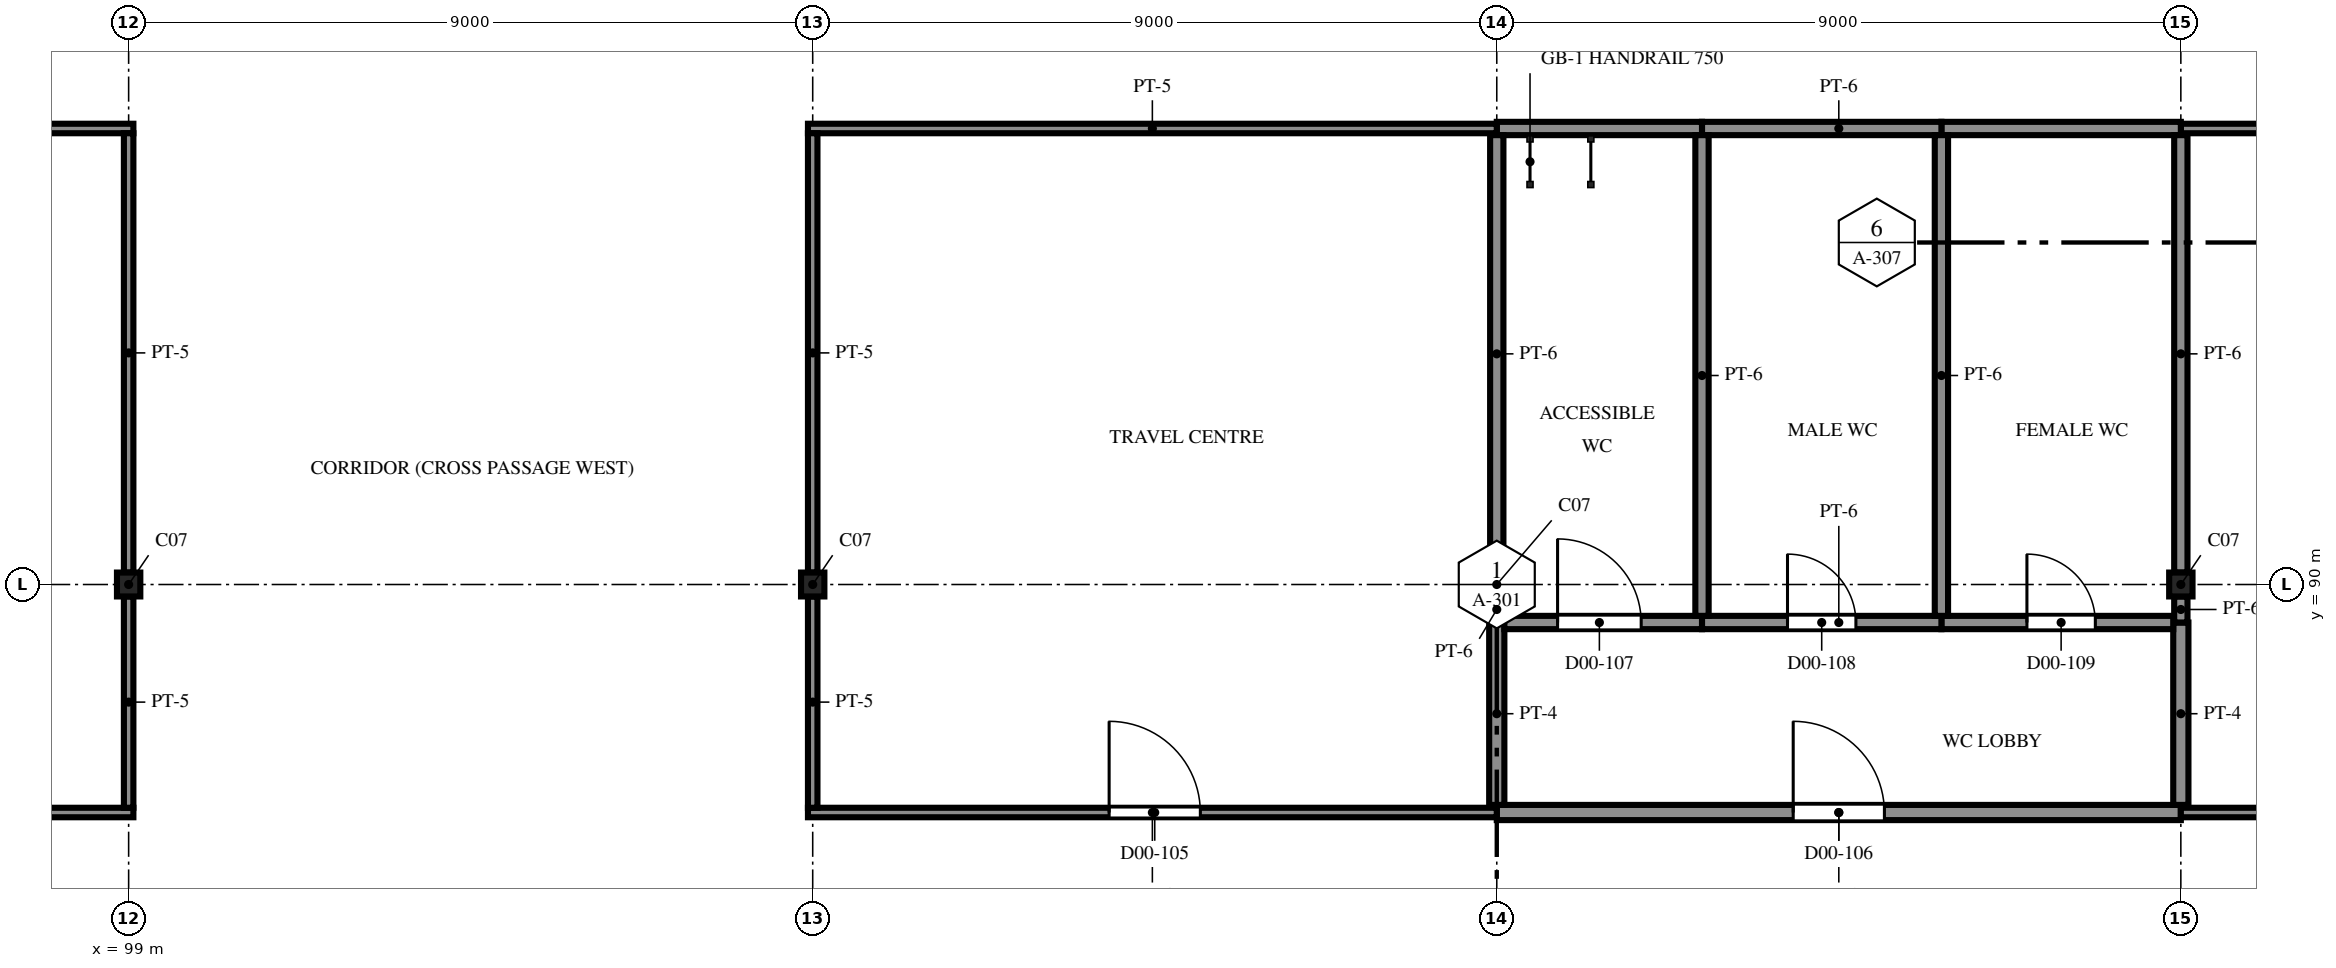
"""IFC4 building model, lengths in metres.
Left out: names, types, materials, properties, quantities, classifications, styles, units other than length and angle.
Written with IfcOpenShell. Run it as: python <this file> out.ifc"""

import sys

from ifc_helpers import new_model, si_unit, direction, frame, frame_2d, origin, origin_2d, place, context, subcontext, project, spatial, polyline, rectangle, i_section, outline, extrude, element, fill, save


model = new_model("IFC4")
c1 = context("Model", 3, precision=1e-05, world=origin(), true_north=direction((0.0, 1.0)))
c2 = subcontext(c1, "Body", "Model", "MODEL_VIEW")
j1 = project(units=[si_unit("LENGTHUNIT", "METRE"), si_unit("PLANEANGLEUNIT", "RADIAN")], contexts=[c1])
p1 = place(None, origin())
s1 = spatial("IfcSite", under=j1, at=p1, CompositionType="ELEMENT")
p2 = place(p1, origin())
s2 = spatial("IfcBuilding", under=s1, at=p2, CompositionType="ELEMENT")
p3 = place(p2, origin())
s3 = spatial("IfcBuildingStorey", under=s2, at=p3, CompositionType="ELEMENT", Elevation=0.0)
for number, where, z_axis, x_axis in (
    (1, (99.0, 90.0, -2.1), (0.0, 0.0, 1.0), (1.0, 0.0, 0.0)),
    (2, (108.0, 90.0, -2.1), (0.0, 0.0, 1.0), (1.0, 0.0, 0.0)),
    (3, (117.0, 90.0, -2.1), (0.0, 0.0, 1.0), (1.0, 0.0, 0.0)),
    (4, (126.0, 90.0, -2.1), (0.0, 0.0, 1.0), (1.0, 0.0, 0.0)),
):
    element("IfcColumn", number, at=place(p3, frame(where, z_axis=z_axis, x_axis=x_axis)), inside=s3, PredefinedType="COLUMN", context=c2, shape_type="SweptSolid", body=[
        extrude(i_section(OverallWidth=0.307, OverallDepth=0.314, WebThickness=0.012, FlangeThickness=0.019, FilletRadius=0.015, at=origin_2d()), origin(), (0.0, 0.0, 1.0), 9.6),
    ])
p4 = place(p3, frame((135.062, 96.0, 0.0), z_axis=(0.0, 0.0, 1.0), x_axis=(-1.0, 0.0, 0.0)))
e5 = element("IfcWall", 5, at=p4, inside=s3, PredefinedType="PARTITIONING", context=c2, shape_type="SweptSolid", body=[
    extrude(rectangle(XDim=9.062, YDim=0.125, at=frame_2d((4.531, 0.0))), origin(), (0.0, 0.0, 1.0), 6.757),
])
p5 = place(p3, frame((126.0, 96.0, 0.0), z_axis=(0.0, 0.0, 1.0), x_axis=(-1.0, 0.0, 0.0)))
e6 = element("IfcWall", 6, at=p5, inside=s3, PredefinedType="PARTITIONING", context=c2, shape_type="SweptSolid", body=[
    extrude(rectangle(XDim=3.15, YDim=0.175, at=frame_2d((1.575, 0.0))), origin(), (0.0, 0.0, 1.0), 6.459),
])
p6 = place(p3, frame((122.85, 96.0, 0.0), z_axis=(0.0, 0.0, 1.0), x_axis=(-1.0, 0.0, 0.0)))
e7 = element("IfcWall", 7, at=p6, inside=s3, PredefinedType="PARTITIONING", context=c2, shape_type="SweptSolid", body=[
    extrude(rectangle(XDim=3.15, YDim=0.175, at=frame_2d((1.575, 0.0))), origin(), (0.0, 0.0, 1.0), 6.459),
])
p7 = place(p3, frame((119.7, 96.0, 0.0), z_axis=(0.0, 0.0, 1.0), x_axis=(-1.0, 0.0, 0.0)))
e8 = element("IfcWall", 8, at=p7, inside=s3, PredefinedType="PARTITIONING", context=c2, shape_type="SweptSolid", body=[
    extrude(rectangle(XDim=2.7, YDim=0.175, at=frame_2d((1.35, 0.0))), origin(), (0.0, 0.0, 1.0), 6.459),
])
for number, where, z_axis, x_axis in (
    (9, (117.0, 96.0, 0.0), (0.0, 0.0, 1.0), (-1.0, 0.0, 0.0)),
    (10, (99.062, 96.0, 0.0), (0.0, 0.0, 1.0), (-1.0, 0.0, 0.0)),
):
    element("IfcWall", number, at=place(p3, frame(where, z_axis=z_axis, x_axis=x_axis)), inside=s3, PredefinedType="PARTITIONING", context=c2, shape_type="SweptSolid", body=[
        extrude(rectangle(XDim=9.062, YDim=0.125, at=frame_2d((4.531, 0.0))), origin(), (0.0, 0.0, 1.0), 6.757),
    ])
p8 = place(p3, frame((117.0, 87.0, 0.0), z_axis=(0.0, 0.0, 1.0), x_axis=(1.0, 0.0, 0.0)))
e11 = element("IfcWall", 11, at=p8, inside=s3, PredefinedType="PARTITIONING", context=c2, shape_type="SweptSolid", body=[
    extrude(rectangle(XDim=9.0, YDim=0.2, at=frame_2d((4.5, 0.0))), origin(), (0.0, 0.0, 1.0), 6.6),
])
p9 = place(p8, frame((3.9, 0.0, 0.0)))
e12 = element("IfcOpeningElement", 12, at=p9, cuts=e11, PredefinedType="OPENING", context=c2, shape_type="SweptSolid", body=[
    extrude(rectangle(XDim=1.2, YDim=2.1, at=frame_2d((0.6, 1.05))), frame((0.0, 0.11, 0.0), z_axis=(0.0, -1.0, 0.0), x_axis=(1.0, 0.0, 0.0)), (0.0, 0.0, 1.0), 0.22),
])
p10 = place(p3, frame((126.0, 87.0, 0.0), z_axis=(0.0, 0.0, 1.0), x_axis=(1.0, 0.0, 0.0)))
e13 = element("IfcWall", 13, at=p10, inside=s3, PredefinedType="PARTITIONING", context=c2, shape_type="SweptSolid", body=[
    extrude(rectangle(XDim=9.062, YDim=0.125, at=frame_2d((4.531, 0.0))), origin(), (0.0, 0.0, 1.0), 6.757),
])
p11 = place(p10, frame((3.9, 0.0, 0.0)))
e14 = element("IfcOpeningElement", 14, at=p11, cuts=e13, PredefinedType="OPENING", context=c2, shape_type="SweptSolid", body=[
    extrude(rectangle(XDim=1.2, YDim=2.1, at=frame_2d((0.6, 1.05))), frame((0.0, 0.073, 0.0), z_axis=(0.0, -1.0, 0.0), x_axis=(1.0, 0.0, 0.0)), (0.0, 0.0, 1.0), 0.145),
])
p12 = place(p3, frame((107.938, 87.0, 0.0), z_axis=(0.0, 0.0, 1.0), x_axis=(1.0, 0.0, 0.0)))
e15 = element("IfcWall", 15, at=p12, inside=s3, PredefinedType="PARTITIONING", context=c2, shape_type="SweptSolid", body=[
    extrude(rectangle(XDim=9.062, YDim=0.125, at=frame_2d((4.531, 0.0))), origin(), (0.0, 0.0, 1.0), 6.757),
])
p13 = place(p12, frame((3.962, 0.0, 0.0)))
e16 = element("IfcOpeningElement", 16, at=p13, cuts=e15, PredefinedType="OPENING", context=c2, shape_type="SweptSolid", body=[
    extrude(rectangle(XDim=1.2, YDim=2.1, at=frame_2d((0.6, 1.05))), frame((0.0, 0.073, 0.0), z_axis=(0.0, -1.0, 0.0), x_axis=(1.0, 0.0, 0.0)), (0.0, 0.0, 1.0), 0.145),
])
p14 = place(p3, frame((90.302, 87.0, 0.0), z_axis=(0.0, 0.0, 1.0), x_axis=(1.0, 0.0, 0.0)))
e17 = element("IfcWall", 17, at=p14, inside=s3, PredefinedType="PARTITIONING", context=c2, shape_type="SweptSolid", body=[
    extrude(rectangle(XDim=8.76, YDim=0.125, at=frame_2d((4.38, 0.0))), origin(), (0.0, 0.0, 1.0), 6.757),
])
p15 = place(p14, frame((3.598, 0.0, 0.0)))
e18 = element("IfcOpeningElement", 18, at=p15, cuts=e17, PredefinedType="OPENING", context=c2, shape_type="SweptSolid", body=[
    extrude(rectangle(XDim=1.2, YDim=2.1, at=frame_2d((0.6, 1.05))), frame((0.0, 0.073, 0.0), z_axis=(0.0, -1.0, 0.0), x_axis=(1.0, 0.0, 0.0)), (0.0, 0.0, 1.0), 0.145),
])
p16 = place(p3, frame((108.0, 95.938, 0.0), z_axis=(0.0, 0.0, 1.0), x_axis=(0.0, -1.0, 0.0)))
e19 = element("IfcWall", 19, at=p16, inside=s3, PredefinedType="PARTITIONING", context=c2, shape_type="SweptSolid", body=[
    extrude(rectangle(XDim=5.78, YDim=0.125, at=frame_2d((2.89, 0.0))), origin(), (0.0, 0.0, 1.0), 6.757),
])
for number, where, z_axis, x_axis in (
    (20, (108.0, 89.843, 0.0), (0.0, 0.0, 1.0), (0.0, -1.0, 0.0)),
    (21, (99.0, 87.062, 0.0), (0.0, 0.0, 1.0), (0.0, 1.0, 0.0)),
):
    element("IfcWall", number, at=place(p3, frame(where, z_axis=z_axis, x_axis=x_axis)), inside=s3, PredefinedType="PARTITIONING", context=c2, shape_type="SweptSolid", body=[
        extrude(rectangle(XDim=2.78, YDim=0.125, at=frame_2d((1.39, 0.0))), origin(), (0.0, 0.0, 1.0), 6.757),
    ])
p17 = place(p3, frame((99.0, 90.157, 0.0), z_axis=(0.0, 0.0, 1.0), x_axis=(0.0, 1.0, 0.0)))
e22 = element("IfcWall", 22, at=p17, inside=s3, PredefinedType="PARTITIONING", context=c2, shape_type="SweptSolid", body=[
    extrude(rectangle(XDim=5.78, YDim=0.125, at=frame_2d((2.89, 0.0))), origin(), (0.0, 0.0, 1.0), 6.757),
])
p18 = place(p3, frame((117.0, 89.5, 0.0), z_axis=(0.0, 0.0, 1.0), x_axis=(0.0, -1.0, 0.0)))
e23 = element("IfcWall", 23, at=p18, inside=s3, PredefinedType="PARTITIONING", context=c2, shape_type="SweptSolid", body=[
    extrude(rectangle(XDim=2.4, YDim=0.2, at=frame_2d((1.2, 0.0))), origin(), (0.0, 0.0, 1.0), 6.6),
])
p19 = place(p3, frame((117.0, 95.913, 0.0), z_axis=(0.0, 0.0, 1.0), x_axis=(0.0, -1.0, 0.0)))
e24 = element("IfcWall", 24, at=p19, inside=s3, PredefinedType="PARTITIONING", context=c2, shape_type="SweptSolid", body=[
    extrude(rectangle(XDim=5.755, YDim=0.175, at=frame_2d((2.878, 0.0))), origin(), (0.0, 0.0, 1.0), 6.459),
])
p20 = place(p3, frame((117.0, 89.843, 0.0), z_axis=(0.0, 0.0, 1.0), x_axis=(0.0, -1.0, 0.0)))
e25 = element("IfcWall", 25, at=p20, inside=s3, PredefinedType="PARTITIONING", context=c2, shape_type="SweptSolid", body=[
    extrude(rectangle(XDim=0.343, YDim=0.175, at=frame_2d((0.171, 0.0))), origin(), (0.0, 0.0, 1.0), 6.459),
])
p21 = place(p3, frame((126.0, 89.5, 0.0), z_axis=(0.0, 0.0, 1.0), x_axis=(0.0, -1.0, 0.0)))
e26 = element("IfcWall", 26, at=p21, inside=s3, PredefinedType="PARTITIONING", context=c2, shape_type="SweptSolid", body=[
    extrude(rectangle(XDim=2.4, YDim=0.2, at=frame_2d((1.2, 0.0))), origin(), (0.0, 0.0, 1.0), 6.6),
])
p22 = place(p3, frame((122.85, 89.5, 0.0), z_axis=(0.0, 0.0, 1.0), x_axis=(1.0, 0.0, 0.0)))
e27 = element("IfcWall", 27, at=p22, inside=s3, PredefinedType="PARTITIONING", context=c2, shape_type="SweptSolid", body=[
    extrude(rectangle(XDim=3.05, YDim=0.175, at=frame_2d((1.525, 0.0))), origin(), (0.0, 0.0, 1.0), 6.459),
])
p23 = place(p22, frame((1.125, 0.0, 0.0)))
e28 = element("IfcOpeningElement", 28, at=p23, cuts=e27, PredefinedType="OPENING", context=c2, shape_type="SweptSolid", body=[
    extrude(rectangle(XDim=0.9, YDim=2.1, at=frame_2d((0.45, 1.05))), frame((0.0, 0.097, 0.0), z_axis=(0.0, -1.0, 0.0), x_axis=(1.0, 0.0, 0.0)), (0.0, 0.0, 1.0), 0.195),
])
p24 = place(p3, frame((119.7, 89.5, 0.0), z_axis=(0.0, 0.0, 1.0), x_axis=(1.0, 0.0, 0.0)))
e29 = element("IfcWall", 29, at=p24, inside=s3, PredefinedType="PARTITIONING", context=c2, shape_type="SweptSolid", body=[
    extrude(rectangle(XDim=3.15, YDim=0.175, at=frame_2d((1.575, 0.0))), origin(), (0.0, 0.0, 1.0), 6.459),
])
p25 = place(p24, frame((1.125, 0.0, 0.0)))
e30 = element("IfcOpeningElement", 30, at=p25, cuts=e29, PredefinedType="OPENING", context=c2, shape_type="SweptSolid", body=[
    extrude(rectangle(XDim=0.9, YDim=2.1, at=frame_2d((0.45, 1.05))), frame((0.0, 0.097, 0.0), z_axis=(0.0, -1.0, 0.0), x_axis=(1.0, 0.0, 0.0)), (0.0, 0.0, 1.0), 0.195),
])
p26 = place(p3, frame((117.1, 89.5, 0.0), z_axis=(0.0, 0.0, 1.0), x_axis=(1.0, 0.0, 0.0)))
e31 = element("IfcWall", 31, at=p26, inside=s3, PredefinedType="PARTITIONING", context=c2, shape_type="SweptSolid", body=[
    extrude(rectangle(XDim=2.6, YDim=0.175, at=frame_2d((1.3, 0.0))), origin(), (0.0, 0.0, 1.0), 6.459),
])
p27 = place(p26, frame((0.7, 0.0, 0.0)))
e32 = element("IfcOpeningElement", 32, at=p27, cuts=e31, PredefinedType="OPENING", context=c2, shape_type="SweptSolid", body=[
    extrude(rectangle(XDim=1.1, YDim=2.1, at=frame_2d((0.55, 1.05))), frame((0.0, 0.097, 0.0), z_axis=(0.0, -1.0, 0.0), x_axis=(1.0, 0.0, 0.0)), (0.0, 0.0, 1.0), 0.195),
])
for number, where, z_axis, x_axis in (
    (33, (119.7, 95.913, 0.0), (0.0, 0.0, 1.0), (0.0, -1.0, 0.0)),
    (34, (122.85, 95.913, 0.0), (0.0, 0.0, 1.0), (0.0, -1.0, 0.0)),
):
    element("IfcWall", number, at=place(p3, frame(where, z_axis=z_axis, x_axis=x_axis)), inside=s3, PredefinedType="PARTITIONING", context=c2, shape_type="SweptSolid", body=[
        extrude(rectangle(XDim=6.325, YDim=0.175, at=frame_2d((3.163, 0.0))), origin(), (0.0, 0.0, 1.0), 6.459),
    ])
p28 = place(p3, frame((126.0, 95.913, 0.0), z_axis=(0.0, 0.0, 1.0), x_axis=(0.0, -1.0, 0.0)))
e35 = element("IfcWall", 35, at=p28, inside=s3, PredefinedType="PARTITIONING", context=c2, shape_type="SweptSolid", body=[
    extrude(rectangle(XDim=5.755, YDim=0.175, at=frame_2d((2.878, 0.0))), origin(), (0.0, 0.0, 1.0), 6.459),
])
p29 = place(p3, frame((126.0, 89.843, 0.0), z_axis=(0.0, 0.0, 1.0), x_axis=(0.0, -1.0, 0.0)))
e36 = element("IfcWall", 36, at=p29, inside=s3, PredefinedType="PARTITIONING", context=c2, shape_type="SweptSolid", body=[
    extrude(rectangle(XDim=0.343, YDim=0.175, at=frame_2d((0.171, 0.0))), origin(), (0.0, 0.0, 1.0), 6.459),
])
p30 = place(p13, origin())
e37 = element("IfcDoor", 37, at=p30, inside=s3, OperationType="DOUBLE_DOOR_SINGLE_SWING", PredefinedType="DOOR", context=c2, shape_type="SweptSolid", body=[
    extrude(outline(polyline([(0.0, 0.0), (0.07, 0.0), (0.07, 2.03), (1.13, 2.03), (1.13, 0.0), (1.2, 0.0), (1.2, 2.1), (0.0, 2.1), (0.0, 0.0)])), frame((0.0, 0.025, 0.0), z_axis=(0.0, -1.0, 0.0), x_axis=(1.0, 0.0, 0.0)), (0.0, 0.0, 1.0), 0.05),
    extrude(outline(polyline([(0.074, 0.01), (0.597, 0.01), (0.597, 2.026), (0.074, 2.026), (0.074, 0.01)]), holes=[polyline([(0.178, 0.373), (0.492, 0.373), (0.492, 1.784), (0.178, 1.784), (0.178, 0.373)])]), frame((0.0, 0.017, 0.0), z_axis=(0.0, -1.0, 0.0), x_axis=(1.0, 0.0, 0.0)), (0.0, 0.0, 1.0), 0.035),
    extrude(rectangle(XDim=0.314, YDim=1.411, at=frame_2d((0.335, 1.079))), frame((0.0, 0.009, 0.0), z_axis=(0.0, -1.0, 0.0), x_axis=(1.0, 0.0, 0.0)), (0.0, 0.0, 1.0), 0.017),
    extrude(outline(polyline([(0.603, 0.01), (1.126, 0.01), (1.126, 2.026), (0.603, 2.026), (0.603, 0.01)]), holes=[polyline([(0.708, 0.373), (1.021, 0.373), (1.021, 1.784), (0.708, 1.784), (0.708, 0.373)])]), frame((0.0, 0.017, 0.0), z_axis=(0.0, -1.0, 0.0), x_axis=(1.0, 0.0, 0.0)), (0.0, 0.0, 1.0), 0.035),
    extrude(rectangle(XDim=0.314, YDim=1.411, at=frame_2d((0.865, 1.079))), frame((0.0, 0.009, 0.0), z_axis=(0.0, -1.0, 0.0), x_axis=(1.0, 0.0, 0.0)), (0.0, 0.0, 1.0), 0.017),
])
fill(e16, e37)
p31 = place(p9, origin())
e38 = element("IfcDoor", 38, at=p31, inside=s3, OperationType="DOUBLE_DOOR_SINGLE_SWING", PredefinedType="DOOR", context=c2, shape_type="SweptSolid", body=[
    extrude(outline(polyline([(0.0, 0.0), (0.07, 0.0), (0.07, 2.03), (1.13, 2.03), (1.13, 0.0), (1.2, 0.0), (1.2, 2.1), (0.0, 2.1), (0.0, 0.0)])), frame((0.0, 0.025, 0.0), z_axis=(0.0, -1.0, 0.0), x_axis=(1.0, 0.0, 0.0)), (0.0, 0.0, 1.0), 0.05),
    extrude(outline(polyline([(0.074, 0.01), (0.597, 0.01), (0.597, 2.026), (0.074, 2.026), (0.074, 0.01)]), holes=[polyline([(0.178, 0.373), (0.492, 0.373), (0.492, 1.784), (0.178, 1.784), (0.178, 0.373)])]), frame((0.0, 0.017, 0.0), z_axis=(0.0, -1.0, 0.0), x_axis=(1.0, 0.0, 0.0)), (0.0, 0.0, 1.0), 0.035),
    extrude(rectangle(XDim=0.314, YDim=1.411, at=frame_2d((0.335, 1.079))), frame((0.0, 0.009, 0.0), z_axis=(0.0, -1.0, 0.0), x_axis=(1.0, 0.0, 0.0)), (0.0, 0.0, 1.0), 0.017),
    extrude(outline(polyline([(0.603, 0.01), (1.126, 0.01), (1.126, 2.026), (0.603, 2.026), (0.603, 0.01)]), holes=[polyline([(0.708, 0.373), (1.021, 0.373), (1.021, 1.784), (0.708, 1.784), (0.708, 0.373)])]), frame((0.0, 0.017, 0.0), z_axis=(0.0, -1.0, 0.0), x_axis=(1.0, 0.0, 0.0)), (0.0, 0.0, 1.0), 0.035),
    extrude(rectangle(XDim=0.314, YDim=1.411, at=frame_2d((0.865, 1.079))), frame((0.0, 0.009, 0.0), z_axis=(0.0, -1.0, 0.0), x_axis=(1.0, 0.0, 0.0)), (0.0, 0.0, 1.0), 0.017),
])
fill(e12, e38)
p32 = place(p27, origin())
e39 = element("IfcDoor", 39, at=p32, inside=s3, OperationType="SINGLE_SWING_LEFT", PredefinedType="DOOR", context=c2, shape_type="SweptSolid", body=[
    extrude(outline(polyline([(0.0, 0.0), (0.07, 0.0), (0.07, 2.03), (1.03, 2.03), (1.03, 0.0), (1.1, 0.0), (1.1, 2.1), (0.0, 2.1), (0.0, 0.0)])), frame((0.0, 0.025, 0.0), z_axis=(0.0, -1.0, 0.0), x_axis=(1.0, 0.0, 0.0)), (0.0, 0.0, 1.0), 0.05),
    extrude(outline(polyline([(0.074, 0.01), (1.026, 0.01), (1.026, 2.026), (0.074, 2.026), (0.074, 0.01)]), holes=[polyline([(0.194, 0.16), (0.906, 0.16), (0.906, 1.01), (0.194, 1.01), (0.194, 0.16)]), polyline([(0.4, 1.16), (0.7, 1.16), (0.7, 1.76), (0.4, 1.76), (0.4, 1.16)])]), frame((0.0, 0.017, 0.0), z_axis=(0.0, -1.0, 0.0), x_axis=(1.0, 0.0, 0.0)), (0.0, 0.0, 1.0), 0.035),
    extrude(rectangle(XDim=0.712, YDim=0.85, at=frame_2d((0.55, 0.585))), frame((0.0, 0.009, 0.0), z_axis=(0.0, -1.0, 0.0), x_axis=(1.0, 0.0, 0.0)), (0.0, 0.0, 1.0), 0.017),
    extrude(rectangle(XDim=0.3, YDim=0.6, at=frame_2d((0.55, 1.46))), frame((0.0, 0.006, 0.0), z_axis=(0.0, -1.0, 0.0), x_axis=(1.0, 0.0, 0.0)), (0.0, 0.0, 1.0), 0.012),
])
fill(e32, e39)
p33 = place(p25, origin())
e40 = element("IfcDoor", 40, at=p33, inside=s3, OperationType="SINGLE_SWING_LEFT", PredefinedType="DOOR", context=c2, shape_type="SweptSolid", body=[
    extrude(outline(polyline([(0.0, 0.0), (0.07, 0.0), (0.07, 2.03), (0.83, 2.03), (0.83, 0.0), (0.9, 0.0), (0.9, 2.1), (0.0, 2.1), (0.0, 0.0)])), frame((0.0, 0.025, 0.0), z_axis=(0.0, -1.0, 0.0), x_axis=(1.0, 0.0, 0.0)), (0.0, 0.0, 1.0), 0.05),
    extrude(outline(polyline([(0.074, 0.01), (0.826, 0.01), (0.826, 2.026), (0.074, 2.026), (0.074, 0.01)]), holes=[polyline([(0.194, 0.16), (0.706, 0.16), (0.706, 1.01), (0.194, 1.01), (0.194, 0.16)]), polyline([(0.3, 1.16), (0.6, 1.16), (0.6, 1.76), (0.3, 1.76), (0.3, 1.16)])]), frame((0.0, 0.017, 0.0), z_axis=(0.0, -1.0, 0.0), x_axis=(1.0, 0.0, 0.0)), (0.0, 0.0, 1.0), 0.035),
    extrude(rectangle(XDim=0.512, YDim=0.85, at=frame_2d((0.45, 0.585))), frame((0.0, 0.009, 0.0), z_axis=(0.0, -1.0, 0.0), x_axis=(1.0, 0.0, 0.0)), (0.0, 0.0, 1.0), 0.017),
    extrude(rectangle(XDim=0.3, YDim=0.6, at=frame_2d((0.45, 1.46))), frame((0.0, 0.006, 0.0), z_axis=(0.0, -1.0, 0.0), x_axis=(1.0, 0.0, 0.0)), (0.0, 0.0, 1.0), 0.012),
])
fill(e30, e40)
p34 = place(p23, origin())
e41 = element("IfcDoor", 41, at=p34, inside=s3, OperationType="SINGLE_SWING_LEFT", PredefinedType="DOOR", context=c2, shape_type="SweptSolid", body=[
    extrude(outline(polyline([(0.0, 0.0), (0.07, 0.0), (0.07, 2.03), (0.83, 2.03), (0.83, 0.0), (0.9, 0.0), (0.9, 2.1), (0.0, 2.1), (0.0, 0.0)])), frame((0.0, 0.025, 0.0), z_axis=(0.0, -1.0, 0.0), x_axis=(1.0, 0.0, 0.0)), (0.0, 0.0, 1.0), 0.05),
    extrude(outline(polyline([(0.074, 0.01), (0.826, 0.01), (0.826, 2.026), (0.074, 2.026), (0.074, 0.01)]), holes=[polyline([(0.194, 0.16), (0.706, 0.16), (0.706, 1.01), (0.194, 1.01), (0.194, 0.16)]), polyline([(0.3, 1.16), (0.6, 1.16), (0.6, 1.76), (0.3, 1.76), (0.3, 1.16)])]), frame((0.0, 0.017, 0.0), z_axis=(0.0, -1.0, 0.0), x_axis=(1.0, 0.0, 0.0)), (0.0, 0.0, 1.0), 0.035),
    extrude(rectangle(XDim=0.512, YDim=0.85, at=frame_2d((0.45, 0.585))), frame((0.0, 0.009, 0.0), z_axis=(0.0, -1.0, 0.0), x_axis=(1.0, 0.0, 0.0)), (0.0, 0.0, 1.0), 0.017),
    extrude(rectangle(XDim=0.3, YDim=0.6, at=frame_2d((0.45, 1.46))), frame((0.0, 0.006, 0.0), z_axis=(0.0, -1.0, 0.0), x_axis=(1.0, 0.0, 0.0)), (0.0, 0.0, 1.0), 0.012),
])
fill(e28, e41)
save(model, sys.argv[1])
